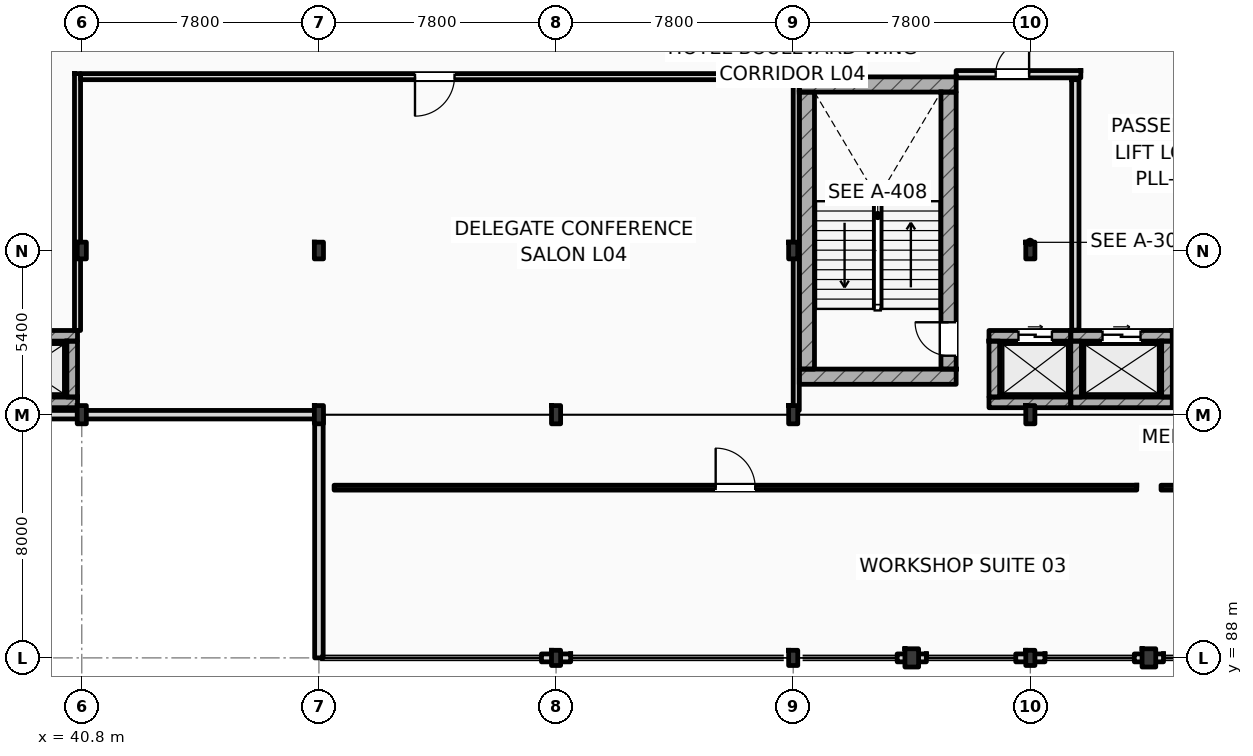
"""IFC4 building model, lengths in metres.
Left out: names, types, materials, properties, quantities, classifications, styles, units other than length and angle.
Written with IfcOpenShell. Run it as: python <this file> out.ifc"""

import sys

from ifc_helpers import new_model, si_unit, direction, frame, frame_2d, origin, origin_2d, place, context, subcontext, project, spatial, rectangle, i_section, extrude, element, fill, save


model = new_model("IFC4")
c1 = context("Model", 3, precision=1e-05, world=origin(), true_north=direction((0.0, 1.0)))
c2 = subcontext(c1, "Body", "Model", "MODEL_VIEW")
j1 = project(units=[si_unit("LENGTHUNIT", "METRE"), si_unit("PLANEANGLEUNIT", "RADIAN")], contexts=[c1])
p1 = place(None, origin())
s1 = spatial("IfcSite", under=j1, at=p1, CompositionType="ELEMENT")
p2 = place(p1, origin())
s2 = spatial("IfcBuilding", under=s1, at=p2, CompositionType="ELEMENT")
p3 = place(p2, frame((0.0, 0.0, 20.4)))
s3 = spatial("IfcBuildingStorey", under=s2, at=p3, CompositionType="ELEMENT", Elevation=20.4)
p4 = place(p3, frame((40.8, 96.0, 0.0), z_axis=(0.0, 0.0, 1.0), x_axis=(1.0, 0.0, 0.0)))
e1 = element("IfcColumn", 1, at=p4, inside=s3, PredefinedType="COLUMN", context=c2, shape_type="SweptSolid", body=[
    extrude(i_section(OverallWidth=0.3, OverallDepth=0.6, WebThickness=0.015, FlangeThickness=0.03, FilletRadius=0.027, at=origin_2d()), origin(), (0.0, 0.0, 1.0), 4.2),
])
p5 = place(p3, frame((40.8, 101.4, 0.0), z_axis=(0.0, 0.0, 1.0), x_axis=(1.0, 0.0, 0.0)))
e2 = element("IfcColumn", 2, at=p5, inside=s3, PredefinedType="COLUMN", context=c2, shape_type="SweptSolid", body=[
    extrude(i_section(OverallWidth=0.3, OverallDepth=0.55, WebThickness=0.015, FlangeThickness=0.029, FilletRadius=0.027, at=origin_2d()), origin(), (0.0, 0.0, 1.0), 4.2),
])
p6 = place(p3, frame((48.6, 96.0, 0.0), z_axis=(0.0, 0.0, 1.0), x_axis=(1.0, 0.0, 0.0)))
e3 = element("IfcColumn", 3, at=p6, inside=s3, PredefinedType="COLUMN", context=c2, shape_type="SweptSolid", body=[
    extrude(i_section(OverallWidth=0.3, OverallDepth=0.6, WebThickness=0.015, FlangeThickness=0.03, FilletRadius=0.027, at=origin_2d()), origin(), (0.0, 0.0, 1.0), 4.2),
])
p7 = place(p3, frame((48.6, 101.4, 0.0), z_axis=(0.0, 0.0, 1.0), x_axis=(1.0, 0.0, 0.0)))
e4 = element("IfcColumn", 4, at=p7, inside=s3, PredefinedType="COLUMN", context=c2, shape_type="SweptSolid", body=[
    extrude(i_section(OverallWidth=0.3, OverallDepth=0.55, WebThickness=0.015, FlangeThickness=0.029, FilletRadius=0.027, at=origin_2d()), origin(), (0.0, 0.0, 1.0), 4.2),
])
p8 = place(p3, frame((56.4, 96.0, 0.0), z_axis=(0.0, 0.0, 1.0), x_axis=(1.0, 0.0, 0.0)))
e5 = element("IfcColumn", 5, at=p8, inside=s3, PredefinedType="COLUMN", context=c2, shape_type="SweptSolid", body=[
    extrude(i_section(OverallWidth=0.3, OverallDepth=0.6, WebThickness=0.015, FlangeThickness=0.03, FilletRadius=0.027, at=origin_2d()), origin(), (0.0, 0.0, 1.0), 4.2),
])
p9 = place(p3, frame((56.4, 101.4, 0.0), z_axis=(0.0, 0.0, 1.0), x_axis=(1.0, 0.0, 0.0)))
e6 = element("IfcColumn", 6, at=p9, inside=s3, PredefinedType="COLUMN", context=c2, shape_type="SweptSolid", body=[
    extrude(i_section(OverallWidth=0.3, OverallDepth=0.55, WebThickness=0.015, FlangeThickness=0.029, FilletRadius=0.027, at=origin_2d()), origin(), (0.0, 0.0, 1.0), 4.2),
])
p10 = place(p3, frame((64.2, 96.0, 0.0), z_axis=(0.0, 0.0, 1.0), x_axis=(1.0, 0.0, 0.0)))
e7 = element("IfcColumn", 7, at=p10, inside=s3, PredefinedType="COLUMN", context=c2, shape_type="SweptSolid", body=[
    extrude(i_section(OverallWidth=0.3, OverallDepth=0.6, WebThickness=0.015, FlangeThickness=0.03, FilletRadius=0.027, at=origin_2d()), origin(), (0.0, 0.0, 1.0), 4.2),
])
p11 = place(p3, frame((64.2, 101.4, 0.0), z_axis=(0.0, 0.0, 1.0), x_axis=(1.0, 0.0, 0.0)))
e8 = element("IfcColumn", 8, at=p11, inside=s3, PredefinedType="COLUMN", context=c2, shape_type="SweptSolid", body=[
    extrude(i_section(OverallWidth=0.3, OverallDepth=0.55, WebThickness=0.015, FlangeThickness=0.029, FilletRadius=0.027, at=origin_2d()), origin(), (0.0, 0.0, 1.0), 4.2),
])
p12 = place(p3, frame((72.0, 96.0, 0.0), z_axis=(0.0, 0.0, 1.0), x_axis=(1.0, 0.0, 0.0)))
e9 = element("IfcColumn", 9, at=p12, inside=s3, PredefinedType="COLUMN", context=c2, shape_type="SweptSolid", body=[
    extrude(i_section(OverallWidth=0.3, OverallDepth=0.6, WebThickness=0.015, FlangeThickness=0.03, FilletRadius=0.027, at=origin_2d()), origin(), (0.0, 0.0, 1.0), 4.2),
])
p13 = place(p3, frame((72.0, 101.4, 0.0), z_axis=(0.0, 0.0, 1.0), x_axis=(1.0, 0.0, 0.0)))
e10 = element("IfcColumn", 10, at=p13, inside=s3, PredefinedType="COLUMN", context=c2, shape_type="SweptSolid", body=[
    extrude(i_section(OverallWidth=0.3, OverallDepth=0.55, WebThickness=0.015, FlangeThickness=0.029, FilletRadius=0.027, at=origin_2d()), origin(), (0.0, 0.0, 1.0), 4.2),
])
for number, where, z_axis, x_axis in (
    (11, (56.4, 88.0, 0.0), (0.0, 0.0, 1.0), (1.0, 0.0, 0.0)),
    (12, (64.2, 88.0, 0.0), (0.0, 0.0, 1.0), (1.0, 0.0, 0.0)),
    (13, (72.0, 88.0, 0.0), (0.0, 0.0, 1.0), (1.0, 0.0, 0.0)),
):
    element("IfcColumn", number, at=place(p3, frame(where, z_axis=z_axis, x_axis=x_axis)), inside=s3, PredefinedType="COLUMN", context=c2, shape_type="SweptSolid", body=[
        extrude(i_section(OverallWidth=0.3, OverallDepth=0.5, WebThickness=0.014, FlangeThickness=0.028, FilletRadius=0.027, at=origin_2d()), origin(), (0.0, 0.0, 1.0), 4.2),
    ])
for number, where, z_axis, x_axis in (
    (14, (68.1, 88.0, 0.0), (0.0, 0.0, 1.0), (1.0, 0.0, 0.0)),
    (15, (75.9, 88.0, 0.0), (0.0, 0.0, 1.0), (1.0, 0.0, 0.0)),
):
    element("IfcColumn", number, at=place(p3, frame(where, z_axis=z_axis, x_axis=x_axis)), inside=s3, PredefinedType="PILASTER", context=c2, shape_type="SweptSolid", body=[
        extrude(rectangle(XDim=0.45, YDim=0.6, at=origin_2d()), origin(), (0.0, 0.0, 1.0), 4.2),
    ])
for number, where, z_axis, x_axis in (
    (16, (64.4, 106.862, 0.0), (0.0, 0.0, 1.0), (1.0, 0.0, 0.0)),
    (17, (64.4, 97.25, 0.0), (0.0, 0.0, 1.0), (1.0, 0.0, 0.0)),
):
    element("IfcWall", number, at=place(p3, frame(where, z_axis=z_axis, x_axis=x_axis)), inside=s3, PredefinedType="SHEAR", context=c2, shape_type="SweptSolid", body=[
        extrude(rectangle(XDim=5.16, YDim=0.5, at=frame_2d((2.58, 0.0))), origin(), (0.0, 0.0, 1.0), 4.2),
    ])
p14 = place(p3, frame((64.65, 97.5, 0.0), z_axis=(0.0, 0.0, 1.0), x_axis=(0.0, 1.0, 0.0)))
e18 = element("IfcWall", 18, at=p14, inside=s3, PredefinedType="SHEAR", context=c2, shape_type="SweptSolid", body=[
    extrude(rectangle(XDim=9.112, YDim=0.5, at=frame_2d((4.556, 0.0))), origin(), (0.0, 0.0, 1.0), 4.2),
])
p15 = place(p3, frame((69.31, 97.5, 0.0), z_axis=(0.0, 0.0, 1.0), x_axis=(0.0, 1.0, 0.0)))
e19 = element("IfcWall", 19, at=p15, inside=s3, PredefinedType="SHEAR", context=c2, shape_type="SweptSolid", body=[
    extrude(rectangle(XDim=9.112, YDim=0.5, at=frame_2d((4.556, 0.0))), origin(), (0.0, 0.0, 1.0), 4.2),
])
p16 = place(p15, frame((0.44, 0.0, 0.0)))
e20 = element("IfcOpeningElement", 20, at=p16, cuts=e19, PredefinedType="OPENING", context=c2, shape_type="SweptSolid", body=[
    extrude(rectangle(XDim=1.1, YDim=2.2, at=frame_2d((0.55, 1.1))), frame((0.0, 0.26, 0.0), z_axis=(0.0, -1.0, 0.0), x_axis=(1.0, 0.0, 0.0)), (0.0, 0.0, 1.0), 0.52),
])
for number, where, z_axis, x_axis in (
    (21, (55.92, 88.0, 0.0), (0.0, 0.0, 1.0), (1.0, 0.0, 0.0)),
    (22, (67.62, 88.0, 0.0), (0.0, 0.0, 1.0), (1.0, 0.0, 0.0)),
    (23, (71.52, 88.0, 0.0), (0.0, 0.0, 1.0), (1.0, 0.0, 0.0)),
    (24, (75.42, 88.0, 0.0), (0.0, 0.0, 1.0), (1.0, 0.0, 0.0)),
):
    element("IfcWall", number, at=place(p3, frame(where, z_axis=z_axis, x_axis=x_axis)), inside=s3, PredefinedType="STANDARD", context=c2, shape_type="SweptSolid", body=[
        extrude(rectangle(XDim=0.96, YDim=0.26, at=frame_2d((0.48, 0.0))), origin(), (0.0, 0.0, 1.0), 3.48),
    ])
p17 = place(p3, frame((48.6, 88.0, 0.0), z_axis=(0.0, 0.0, 1.0), x_axis=(0.0, 1.0, 0.0)))
e25 = element("IfcWall", 25, at=p17, inside=s3, PredefinedType="STANDARD", context=c2, shape_type="SweptSolid", body=[
    extrude(rectangle(XDim=8.0, YDim=0.28, at=frame_2d((4.0, 0.0))), origin(), (0.0, 0.0, 1.0), 3.94),
])
p18 = place(p3, frame((25.2, 96.0, 0.0), z_axis=(0.0, 0.0, 1.0), x_axis=(1.0, 0.0, 0.0)))
e26 = element("IfcWall", 26, at=p18, inside=s3, PredefinedType="STANDARD", context=c2, shape_type="SweptSolid", body=[
    extrude(rectangle(XDim=23.4, YDim=0.28, at=frame_2d((11.7, 0.0))), origin(), (0.0, 0.0, 1.0), 3.48),
])
p19 = place(p3, frame((70.64, 98.595, 0.0), z_axis=(0.0, 0.0, 1.0), x_axis=(1.0, 0.0, 0.0)))
e27 = element("IfcWall", 27, at=p19, inside=s3, PredefinedType="SHEAR", context=c2, shape_type="SweptSolid", body=[
    extrude(rectangle(XDim=2.69, YDim=0.35, at=frame_2d((1.345, 0.0))), origin(), (0.0, 0.0, 1.0), 3.94),
])
p20 = place(p19, frame((0.97, 0.0, 0.0)))
e28 = element("IfcOpeningElement", 28, at=p20, cuts=e27, PredefinedType="OPENING", context=c2, shape_type="SweptSolid", body=[
    extrude(rectangle(XDim=1.1, YDim=2.2, at=frame_2d((0.55, 1.1))), frame((0.0, 0.185, 0.0), z_axis=(0.0, -1.0, 0.0), x_axis=(1.0, 0.0, 0.0)), (0.0, 0.0, 1.0), 0.37),
])
p21 = place(p3, frame((70.64, 96.405, 0.0), z_axis=(0.0, 0.0, 1.0), x_axis=(1.0, 0.0, 0.0)))
e29 = element("IfcWall", 29, at=p21, inside=s3, PredefinedType="SHEAR", context=c2, shape_type="SweptSolid", body=[
    extrude(rectangle(XDim=2.69, YDim=0.35, at=frame_2d((1.345, 0.0))), origin(), (0.0, 0.0, 1.0), 3.94),
])
p22 = place(p3, frame((70.815, 96.58, 0.0), z_axis=(0.0, 0.0, 1.0), x_axis=(0.0, 1.0, 0.0)))
e30 = element("IfcWall", 30, at=p22, inside=s3, PredefinedType="SHEAR", context=c2, shape_type="SweptSolid", body=[
    extrude(rectangle(XDim=1.84, YDim=0.35, at=frame_2d((0.92, 0.0))), origin(), (0.0, 0.0, 1.0), 3.94),
])
p23 = place(p3, frame((37.67, 98.595, 0.0), z_axis=(0.0, 0.0, 1.0), x_axis=(1.0, 0.0, 0.0)))
e31 = element("IfcWall", 31, at=p23, inside=s3, PredefinedType="SHEAR", context=c2, shape_type="SweptSolid", body=[
    extrude(rectangle(XDim=2.99, YDim=0.35, at=frame_2d((1.495, 0.0))), origin(), (0.0, 0.0, 1.0), 3.94),
])
p24 = place(p23, frame((0.695, 0.0, 0.0)))
e32 = element("IfcOpeningElement", 32, at=p24, cuts=e31, PredefinedType="OPENING", context=c2, shape_type="SweptSolid", body=[
    extrude(rectangle(XDim=1.25, YDim=2.25, at=frame_2d((0.625, 1.125))), frame((0.0, 0.185, 0.0), z_axis=(0.0, -1.0, 0.0), x_axis=(1.0, 0.0, 0.0)), (0.0, 0.0, 1.0), 0.37),
])
p25 = place(p3, frame((37.67, 96.405, 0.0), z_axis=(0.0, 0.0, 1.0), x_axis=(1.0, 0.0, 0.0)))
e33 = element("IfcWall", 33, at=p25, inside=s3, PredefinedType="SHEAR", context=c2, shape_type="SweptSolid", body=[
    extrude(rectangle(XDim=2.99, YDim=0.35, at=frame_2d((1.495, 0.0))), origin(), (0.0, 0.0, 1.0), 3.94),
])
p26 = place(p3, frame((40.485, 96.58, 0.0), z_axis=(0.0, 0.0, 1.0), x_axis=(0.0, 1.0, 0.0)))
e34 = element("IfcWall", 34, at=p26, inside=s3, PredefinedType="SHEAR", context=c2, shape_type="SweptSolid", body=[
    extrude(rectangle(XDim=1.84, YDim=0.35, at=frame_2d((0.92, 0.0))), origin(), (0.0, 0.0, 1.0), 3.53),
])
p27 = place(p3, frame((73.33, 98.595, 0.0), z_axis=(0.0, 0.0, 1.0), x_axis=(1.0, 0.0, 0.0)))
e35 = element("IfcWall", 35, at=p27, inside=s3, PredefinedType="SHEAR", context=c2, shape_type="SweptSolid", body=[
    extrude(rectangle(XDim=3.34, YDim=0.35, at=frame_2d((1.67, 0.0))), origin(), (0.0, 0.0, 1.0), 3.94),
])
p28 = place(p27, frame((1.045, 0.0, 0.0)))
e36 = element("IfcOpeningElement", 36, at=p28, cuts=e35, PredefinedType="OPENING", context=c2, shape_type="SweptSolid", body=[
    extrude(rectangle(XDim=1.25, YDim=2.25, at=frame_2d((0.625, 1.125))), frame((0.0, 0.185, 0.0), z_axis=(0.0, -1.0, 0.0), x_axis=(1.0, 0.0, 0.0)), (0.0, 0.0, 1.0), 0.37),
])
p29 = place(p3, frame((73.33, 96.405, 0.0), z_axis=(0.0, 0.0, 1.0), x_axis=(1.0, 0.0, 0.0)))
e37 = element("IfcWall", 37, at=p29, inside=s3, PredefinedType="SHEAR", context=c2, shape_type="SweptSolid", body=[
    extrude(rectangle(XDim=3.34, YDim=0.35, at=frame_2d((1.67, 0.0))), origin(), (0.0, 0.0, 1.0), 3.94),
])
for number, where, z_axis, x_axis in (
    (38, (73.505, 96.58, 0.0), (0.0, 0.0, 1.0), (0.0, 1.0, 0.0)),
    (39, (76.495, 96.58, 0.0), (0.0, 0.0, 1.0), (0.0, 1.0, 0.0)),
):
    element("IfcWall", number, at=place(p3, frame(where, z_axis=z_axis, x_axis=x_axis)), inside=s3, PredefinedType="SHEAR", context=c2, shape_type="SweptSolid", body=[
        extrude(rectangle(XDim=1.84, YDim=0.35, at=frame_2d((0.92, 0.0))), origin(), (0.0, 0.0, 1.0), 3.94),
    ])
p30 = place(p3, frame((76.67, 98.595, 0.0), z_axis=(0.0, 0.0, 1.0), x_axis=(1.0, 0.0, 0.0)))
e40 = element("IfcWall", 40, at=p30, inside=s3, PredefinedType="SHEAR", context=c2, shape_type="SweptSolid", body=[
    extrude(rectangle(XDim=2.99, YDim=0.35, at=frame_2d((1.495, 0.0))), origin(), (0.0, 0.0, 1.0), 3.94),
])
p31 = place(p30, frame((0.695, 0.0, 0.0)))
e41 = element("IfcOpeningElement", 41, at=p31, cuts=e40, PredefinedType="OPENING", context=c2, shape_type="SweptSolid", body=[
    extrude(rectangle(XDim=1.25, YDim=2.25, at=frame_2d((0.625, 1.125))), frame((0.0, 0.185, 0.0), z_axis=(0.0, -1.0, 0.0), x_axis=(1.0, 0.0, 0.0)), (0.0, 0.0, 1.0), 0.37),
])
p32 = place(p3, frame((76.67, 96.405, 0.0), z_axis=(0.0, 0.0, 1.0), x_axis=(1.0, 0.0, 0.0)))
e42 = element("IfcWall", 42, at=p32, inside=s3, PredefinedType="SHEAR", context=c2, shape_type="SweptSolid", body=[
    extrude(rectangle(XDim=2.99, YDim=0.35, at=frame_2d((1.495, 0.0))), origin(), (0.0, 0.0, 1.0), 3.94),
])
p33 = place(p3, frame((73.48, 98.78, 0.0), z_axis=(0.0, 0.0, 1.0), x_axis=(0.0, 1.0, 0.0)))
e43 = element("IfcWall", 43, at=p33, inside=s3, PredefinedType="STANDARD", context=c2, shape_type="SweptSolid", body=[
    extrude(rectangle(XDim=8.24, YDim=0.24, at=frame_2d((4.12, 0.0))), origin(), (0.0, 0.0, 1.0), 3.94),
])
p34 = place(p3, frame((69.56, 107.2, 0.0), z_axis=(0.0, 0.0, 1.0), x_axis=(1.0, 0.0, 0.0)))
e44 = element("IfcWall", 44, at=p34, inside=s3, PredefinedType="STANDARD", context=c2, shape_type="SweptSolid", body=[
    extrude(rectangle(XDim=4.1, YDim=0.24, at=frame_2d((2.05, 0.0))), origin(), (0.0, 0.0, 1.0), 3.94),
])
p35 = place(p34, frame((1.3, 0.0, 0.0)))
e45 = element("IfcOpeningElement", 45, at=p35, cuts=e44, PredefinedType="OPENING", context=c2, shape_type="SweptSolid", body=[
    extrude(rectangle(XDim=1.1, YDim=2.2, at=frame_2d((0.55, 1.1))), frame((0.0, 0.13, 0.0), z_axis=(0.0, -1.0, 0.0), x_axis=(1.0, 0.0, 0.0)), (0.0, 0.0, 1.0), 0.26),
])
p36 = place(p3, frame((40.76, 107.12, 0.0), z_axis=(0.0, 0.0, 1.0), x_axis=(1.0, 0.0, 0.0)))
e46 = element("IfcWall", 46, at=p36, inside=s3, PredefinedType="PARTITIONING", context=c2, shape_type="SweptSolid", body=[
    extrude(rectangle(XDim=23.44, YDim=0.2, at=frame_2d((11.72, 0.0))), origin(), (0.0, 0.0, 1.0), 3.94),
])
p37 = place(p36, frame((11.0, 0.0, 0.0)))
e47 = element("IfcOpeningElement", 47, at=p37, cuts=e46, PredefinedType="OPENING", context=c2, shape_type="SweptSolid", body=[
    extrude(rectangle(XDim=1.3, YDim=2.2, at=frame_2d((0.65, 1.1))), frame((0.0, 0.11, 0.0), z_axis=(0.0, -1.0, 0.0), x_axis=(1.0, 0.0, 0.0)), (0.0, 0.0, 1.0), 0.22),
])
p38 = place(p3, frame((40.66, 98.77, 0.0), z_axis=(0.0, 0.0, 1.0), x_axis=(0.0, 1.0, 0.0)))
e48 = element("IfcWall", 48, at=p38, inside=s3, PredefinedType="PARTITIONING", context=c2, shape_type="SweptSolid", body=[
    extrude(rectangle(XDim=8.45, YDim=0.2, at=frame_2d((4.225, 0.0))), origin(), (0.0, 0.0, 1.0), 3.53),
])
p39 = place(p3, frame((64.3, 96.14, 0.0), z_axis=(0.0, 0.0, 1.0), x_axis=(0.0, 1.0, 0.0)))
e49 = element("IfcWall", 49, at=p39, inside=s3, PredefinedType="PARTITIONING", context=c2, shape_type="SweptSolid", body=[
    extrude(rectangle(XDim=11.08, YDim=0.2, at=frame_2d((5.54, 0.0))), origin(), (0.0, 0.0, 1.0), 3.53),
])
p40 = place(p3, frame((49.1, 93.6, 0.0), z_axis=(0.0, 0.0, 1.0), x_axis=(1.0, 0.0, 0.0)))
e50 = element("IfcWall", 50, at=p40, inside=s3, PredefinedType="PARTITIONING", context=c2, shape_type="SweptSolid", body=[
    extrude(rectangle(XDim=26.4, YDim=0.16, at=frame_2d((13.2, 0.0))), origin(), (0.0, 0.0, 1.0), 3.94),
])
p41 = place(p40, frame((12.55, 0.0, 0.0)))
e51 = element("IfcOpeningElement", 51, at=p41, cuts=e50, PredefinedType="OPENING", context=c2, shape_type="SweptSolid", body=[
    extrude(rectangle(XDim=1.3, YDim=2.2, at=frame_2d((0.65, 1.1))), frame((0.0, 0.09, 0.0), z_axis=(0.0, -1.0, 0.0), x_axis=(1.0, 0.0, 0.0)), (0.0, 0.0, 1.0), 0.18),
])
p42 = place(p3, frame((76.3, 93.6, 0.0), z_axis=(0.0, 0.0, 1.0), x_axis=(1.0, 0.0, 0.0)))
e52 = element("IfcWall", 52, at=p42, inside=s3, PredefinedType="PARTITIONING", context=c2, shape_type="SweptSolid", body=[
    extrude(rectangle(XDim=26.2, YDim=0.16, at=frame_2d((13.1, 0.0))), origin(), (0.0, 0.0, 1.0), 3.94),
])
p43 = place(p42, frame((12.45, 0.0, 0.0)))
e53 = element("IfcOpeningElement", 53, at=p43, cuts=e52, PredefinedType="OPENING", context=c2, shape_type="SweptSolid", body=[
    extrude(rectangle(XDim=1.3, YDim=2.2, at=frame_2d((0.65, 1.1))), frame((0.0, 0.09, 0.0), z_axis=(0.0, -1.0, 0.0), x_axis=(1.0, 0.0, 0.0)), (0.0, 0.0, 1.0), 0.18),
])
p44 = place(p16, origin())
e54 = element("IfcDoor", 54, at=p44, inside=s3, OperationType="SINGLE_SWING_RIGHT", PredefinedType="DOOR", context=c2, shape_type="SweptSolid", body=[
    extrude(rectangle(XDim=1.1, YDim=2.2, at=frame_2d((0.55, 1.1))), frame((0.0, 0.025, 0.0), z_axis=(0.0, -1.0, 0.0), x_axis=(1.0, 0.0, 0.0)), (0.0, 0.0, 1.0), 0.05),
])
fill(e20, e54)
p45 = place(p20, origin())
e55 = element("IfcDoor", 55, at=p45, inside=s3, OperationType="SLIDING_TO_LEFT", PredefinedType="DOOR", context=c2, shape_type="SweptSolid", body=[
    extrude(rectangle(XDim=1.1, YDim=2.2, at=frame_2d((0.55, 1.1))), frame((0.0, 0.025, 0.0), z_axis=(0.0, -1.0, 0.0), x_axis=(1.0, 0.0, 0.0)), (0.0, 0.0, 1.0), 0.05),
])
fill(e28, e55)
p46 = place(p28, origin())
e56 = element("IfcDoor", 56, at=p46, inside=s3, OperationType="SLIDING_TO_LEFT", PredefinedType="DOOR", context=c2, shape_type="SweptSolid", body=[
    extrude(rectangle(XDim=1.25, YDim=2.25, at=frame_2d((0.625, 1.125))), frame((0.0, 0.025, 0.0), z_axis=(0.0, -1.0, 0.0), x_axis=(1.0, 0.0, 0.0)), (0.0, 0.0, 1.0), 0.05),
])
fill(e36, e56)
p47 = place(p35, origin())
e57 = element("IfcDoor", 57, at=p47, inside=s3, OperationType="SINGLE_SWING_RIGHT", PredefinedType="DOOR", context=c2, shape_type="SweptSolid", body=[
    extrude(rectangle(XDim=1.1, YDim=2.2, at=frame_2d((0.55, 1.1))), frame((0.0, 0.025, 0.0), z_axis=(0.0, -1.0, 0.0), x_axis=(1.0, 0.0, 0.0)), (0.0, 0.0, 1.0), 0.05),
])
fill(e45, e57)
p48 = place(p37, frame((1.3, 0.0, 0.0), z_axis=(0.0, 0.0, 1.0), x_axis=(-1.0, 0.0, 0.0)))
e58 = element("IfcDoor", 58, at=p48, inside=s3, OperationType="SINGLE_SWING_LEFT", PredefinedType="DOOR", context=c2, shape_type="SweptSolid", body=[
    extrude(rectangle(XDim=1.3, YDim=2.2, at=frame_2d((0.65, 1.1))), frame((0.0, 0.025, 0.0), z_axis=(0.0, -1.0, 0.0), x_axis=(1.0, 0.0, 0.0)), (0.0, 0.0, 1.0), 0.05),
])
fill(e47, e58)
p49 = place(p41, origin())
e59 = element("IfcDoor", 59, at=p49, inside=s3, OperationType="SINGLE_SWING_LEFT", PredefinedType="DOOR", context=c2, shape_type="SweptSolid", body=[
    extrude(rectangle(XDim=1.3, YDim=2.2, at=frame_2d((0.65, 1.1))), frame((0.0, 0.025, 0.0), z_axis=(0.0, -1.0, 0.0), x_axis=(1.0, 0.0, 0.0)), (0.0, 0.0, 1.0), 0.05),
])
fill(e51, e59)
save(model, sys.argv[1])
